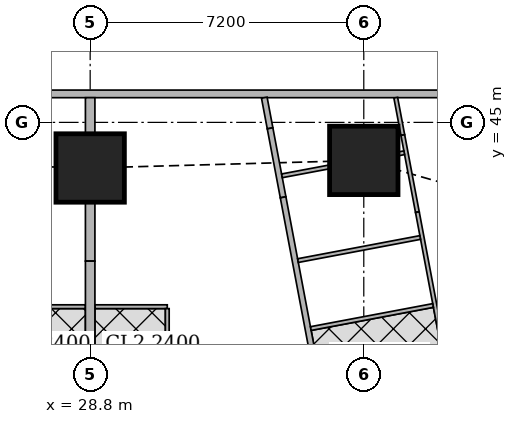
"""IFC4 building model, lengths in metres.
Left out: names, types, materials, properties, quantities, classifications, styles, units other than length and angle.
Written with IfcOpenShell. Run it as: python <this file> out.ifc"""

import sys

from ifc_helpers import new_model, si_unit, direction, frame, frame_2d, origin, origin_2d, place, context, subcontext, project, spatial, rectangle, extrude, element, fill, save


model = new_model("IFC4")
c1 = context("Model", 3, precision=1e-05, world=origin(), true_north=direction((0.0, 1.0)))
c2 = subcontext(c1, "Body", "Model", "MODEL_VIEW")
j1 = project(units=[si_unit("LENGTHUNIT", "METRE"), si_unit("PLANEANGLEUNIT", "RADIAN")], contexts=[c1])
p1 = place(None, origin())
s1 = spatial("IfcSite", under=j1, at=p1, CompositionType="ELEMENT")
p2 = place(p1, origin())
s2 = spatial("IfcBuilding", under=s1, at=p2, CompositionType="ELEMENT")
p3 = place(p2, frame((0.0, 0.0, 169.55)))
s3 = spatial("IfcBuildingStorey", under=s2, at=p3, CompositionType="ELEMENT", Elevation=169.55)
for number, where, z_axis, x_axis in (
    (1, (28.8, 43.8, 0.0), (0.0, 0.0, 1.0), (1.0, 0.0, 0.0)),
    (2, (36.0, 44.0, 0.0), (0.0, 0.0, 1.0), (1.0, 0.0, 0.0)),
):
    element("IfcColumn", number, at=place(p3, frame(where, z_axis=z_axis, x_axis=x_axis)), inside=s3, PredefinedType="COLUMN", context=c2, shape_type="SweptSolid", body=[
        extrude(rectangle(XDim=1.8, YDim=1.8, at=origin_2d()), origin(), (0.0, 0.0, 1.0), 3.75),
    ])
p4 = place(p3, frame((40.106, 45.75, 0.0), z_axis=(0.0, 0.0, 1.0), x_axis=(-1.0, 0.0, 0.0)))
e3 = element("IfcWall", 3, at=p4, inside=s3, PredefinedType="SOLIDWALL", context=c2, shape_type="SweptSolid", body=[
    extrude(rectangle(XDim=37.943, YDim=0.2, at=frame_2d((18.971, 0.0))), origin(), (0.0, 0.0, 1.0), 3.5),
])
p5 = place(p4, frame((8.606, 0.0, 0.9)))
e4 = element("IfcOpeningElement", 4, at=p5, cuts=e3, PredefinedType="OPENING", context=c2, shape_type="SweptSolid", body=[
    extrude(rectangle(XDim=1.8, YDim=1.5, at=frame_2d((0.9, 0.75))), frame((0.0, 0.11, 0.0), z_axis=(0.0, -1.0, 0.0), x_axis=(1.0, 0.0, 0.0)), (0.0, 0.0, 1.0), 0.22),
])
p6 = place(p4, frame((12.206, 0.0, 0.9)))
e5 = element("IfcOpeningElement", 5, at=p6, cuts=e3, PredefinedType="OPENING", context=c2, shape_type="SweptSolid", body=[
    extrude(rectangle(XDim=1.8, YDim=1.5, at=frame_2d((0.9, 0.75))), frame((0.0, 0.11, 0.0), z_axis=(0.0, -1.0, 0.0), x_axis=(1.0, 0.0, 0.0)), (0.0, 0.0, 1.0), 0.22),
])
p7 = place(p4, frame((15.806, 0.0, 0.9)))
e6 = element("IfcOpeningElement", 6, at=p7, cuts=e3, PredefinedType="OPENING", context=c2, shape_type="SweptSolid", body=[
    extrude(rectangle(XDim=1.8, YDim=1.5, at=frame_2d((0.9, 0.75))), frame((0.0, 0.11, 0.0), z_axis=(0.0, -1.0, 0.0), x_axis=(1.0, 0.0, 0.0)), (0.0, 0.0, 1.0), 0.22),
])
p8 = place(p4, frame((19.406, 0.0, 0.9)))
e7 = element("IfcOpeningElement", 7, at=p8, cuts=e3, PredefinedType="OPENING", context=c2, shape_type="SweptSolid", body=[
    extrude(rectangle(XDim=1.8, YDim=1.5, at=frame_2d((0.9, 0.75))), frame((0.0, 0.11, 0.0), z_axis=(0.0, -1.0, 0.0), x_axis=(1.0, 0.0, 0.0)), (0.0, 0.0, 1.0), 0.22),
])
p9 = place(p4, frame((23.006, 0.0, 0.9)))
e8 = element("IfcOpeningElement", 8, at=p9, cuts=e3, PredefinedType="OPENING", context=c2, shape_type="SweptSolid", body=[
    extrude(rectangle(XDim=1.8, YDim=1.5, at=frame_2d((0.9, 0.75))), frame((0.0, 0.11, 0.0), z_axis=(0.0, -1.0, 0.0), x_axis=(1.0, 0.0, 0.0)), (0.0, 0.0, 1.0), 0.22),
])
p10 = place(p4, frame((26.606, 0.0, 0.9)))
e9 = element("IfcOpeningElement", 9, at=p10, cuts=e3, PredefinedType="OPENING", context=c2, shape_type="SweptSolid", body=[
    extrude(rectangle(XDim=1.8, YDim=1.5, at=frame_2d((0.9, 0.75))), frame((0.0, 0.11, 0.0), z_axis=(0.0, -1.0, 0.0), x_axis=(1.0, 0.0, 0.0)), (0.0, 0.0, 1.0), 0.22),
])
p11 = place(p3, frame((33.382, 45.65, 0.0), z_axis=(0.0, 0.0, 1.0), x_axis=(0.185169202764, -0.982706653253, 0.0)))
e10 = element("IfcWall", 10, at=p11, inside=s3, PredefinedType="SOLIDWALL", context=c2, shape_type="SweptSolid", body=[
    extrude(rectangle(XDim=0.82, YDim=0.15, at=frame_2d((0.41, 0.0))), origin(), (0.0, 0.0, 1.0), 3.5),
])
p12 = place(p3, frame((33.534, 44.844, 0.0), z_axis=(0.0, 0.0, 1.0), x_axis=(0.185708872674, -0.982604811005, 0.0)))
e11 = element("IfcWall", 11, at=p12, inside=s3, PredefinedType="SOLIDWALL", context=c2, shape_type="SweptSolid", body=[
    extrude(rectangle(XDim=1.847, YDim=0.15, at=frame_2d((0.924, 0.0))), origin(), (0.0, 0.0, 1.0), 2.1),
])
p13 = place(p3, frame((33.877, 43.029, 0.0), z_axis=(0.0, 0.0, 1.0), x_axis=(0.185596841028, -0.98262597798, 0.0)))
e12 = element("IfcWall", 12, at=p13, inside=s3, PredefinedType="SOLIDWALL", context=c2, shape_type="SweptSolid", body=[
    extrude(rectangle(XDim=41.66, YDim=0.15, at=frame_2d((20.83, 0.0))), origin(), (0.0, 0.0, 1.0), 2.5),
])
p14 = place(p13, frame((8.63, 0.0, 0.0)))
e13 = element("IfcOpeningElement", 13, at=p14, cuts=e12, PredefinedType="OPENING", context=c2, shape_type="SweptSolid", body=[
    extrude(rectangle(XDim=1.0, YDim=2.1, at=frame_2d((0.5, 1.05))), frame((0.0, 0.085, 0.0), z_axis=(0.0, -1.0, 0.0), x_axis=(1.0, 0.0, 0.0)), (0.0, 0.0, 1.0), 0.17),
])
p15 = place(p13, frame((13.841, 0.0, 0.0)))
e14 = element("IfcOpeningElement", 14, at=p15, cuts=e12, PredefinedType="OPENING", context=c2, shape_type="SweptSolid", body=[
    extrude(rectangle(XDim=1.0, YDim=2.1, at=frame_2d((0.5, 1.05))), frame((0.0, 0.085, 0.0), z_axis=(0.0, -1.0, 0.0), x_axis=(1.0, 0.0, 0.0)), (0.0, 0.0, 1.0), 0.17),
])
p16 = place(p13, frame((21.474, 0.0, 0.0)))
e15 = element("IfcOpeningElement", 15, at=p16, cuts=e12, PredefinedType="OPENING", context=c2, shape_type="SweptSolid", body=[
    extrude(rectangle(XDim=1.0, YDim=2.1, at=frame_2d((0.5, 1.05))), frame((0.0, 0.085, 0.0), z_axis=(0.0, -1.0, 0.0), x_axis=(1.0, 0.0, 0.0)), (0.0, 0.0, 1.0), 0.17),
])
p17 = place(p13, frame((30.4, 0.0, 0.0)))
e16 = element("IfcOpeningElement", 16, at=p17, cuts=e12, PredefinedType="OPENING", context=c2, shape_type="SweptSolid", body=[
    extrude(rectangle(XDim=1.0, YDim=2.1, at=frame_2d((0.5, 1.05))), frame((0.0, 0.085, 0.0), z_axis=(0.0, -1.0, 0.0), x_axis=(1.0, 0.0, 0.0)), (0.0, 0.0, 1.0), 0.17),
])
p18 = place(p13, frame((32.288, 0.0, 0.0)))
e17 = element("IfcOpeningElement", 17, at=p18, cuts=e12, PredefinedType="OPENING", context=c2, shape_type="SweptSolid", body=[
    extrude(rectangle(XDim=1.0, YDim=2.1, at=frame_2d((0.5, 1.05))), frame((0.0, 0.085, 0.0), z_axis=(0.0, -1.0, 0.0), x_axis=(1.0, 0.0, 0.0)), (0.0, 0.0, 1.0), 0.17),
])
p19 = place(p3, frame((36.841, 45.65, 0.0), z_axis=(0.0, 0.0, 1.0), x_axis=(0.185789875365, -0.982589498322, 0.0)))
e18 = element("IfcWall", 18, at=p19, inside=s3, PredefinedType="PARTITIONING", context=c2, shape_type="SweptSolid", body=[
    extrude(rectangle(XDim=1.001, YDim=0.1, at=frame_2d((0.5, 0.0))), origin(), (0.0, 0.0, 1.0), 3.5),
])
p20 = place(p3, frame((37.027, 44.666, 0.0), z_axis=(0.0, 0.0, 1.0), x_axis=(0.1855674151, -0.982631535446, 0.0)))
e19 = element("IfcWall", 19, at=p20, inside=s3, PredefinedType="PARTITIONING", context=c2, shape_type="SweptSolid", body=[
    extrude(rectangle(XDim=2.063, YDim=0.1, at=frame_2d((1.031, 0.0))), origin(), (0.0, 0.0, 1.0), 2.1),
])
p21 = place(p3, frame((37.41, 42.639, 0.0), z_axis=(0.0, 0.0, 1.0), x_axis=(0.185579683022, -0.982629218601, 0.0)))
e20 = element("IfcWall", 20, at=p21, inside=s3, PredefinedType="PARTITIONING", context=c2, shape_type="SweptSolid", body=[
    extrude(rectangle(XDim=4.737, YDim=0.1, at=frame_2d((2.369, 0.0))), origin(), (0.0, 0.0, 1.0), 3.5),
])
p22 = place(p21, frame((3.189, 0.0, 0.0)))
e21 = element("IfcOpeningElement", 21, at=p22, cuts=e20, PredefinedType="OPENING", context=c2, shape_type="SweptSolid", body=[
    extrude(rectangle(XDim=0.9, YDim=2.1, at=frame_2d((0.45, 1.05))), frame((0.0, 0.06, 0.0), z_axis=(0.0, -1.0, 0.0), x_axis=(1.0, 0.0, 0.0)), (0.0, 0.0, 1.0), 0.12),
])
p23 = place(p21, frame((1.131, 0.0, 0.0)))
e22 = element("IfcOpeningElement", 22, at=p23, cuts=e20, PredefinedType="OPENING", context=c2, shape_type="SweptSolid", body=[
    extrude(rectangle(XDim=0.9, YDim=2.1, at=frame_2d((0.45, 1.05))), frame((0.0, 0.06, 0.0), z_axis=(0.0, -1.0, 0.0), x_axis=(1.0, 0.0, 0.0)), (0.0, 0.0, 1.0), 0.12),
])
p24 = place(p3, frame((37.064, 44.201, 0.0), z_axis=(0.0, 0.0, 1.0), x_axis=(-0.982960250751, -0.183818240236, 0.0)))
e23 = element("IfcWall", 23, at=p24, inside=s3, PredefinedType="PARTITIONING", context=c2, shape_type="SweptSolid", body=[
    extrude(rectangle(XDim=0.157, YDim=0.1, at=frame_2d((0.078, 0.0))), origin(), (0.0, 0.0, 1.0), 2.1),
])
p25 = place(p3, frame((35.09, 43.828, 0.0), z_axis=(0.0, 0.0, 1.0), x_axis=(-0.982758384778, -0.184894448668, 0.0)))
e24 = element("IfcWall", 24, at=p25, inside=s3, PredefinedType="PARTITIONING", context=c2, shape_type="SweptSolid", body=[
    extrude(rectangle(XDim=1.265, YDim=0.1, at=frame_2d((0.632, 0.0))), origin(), (0.0, 0.0, 1.0), 2.1),
])
p26 = place(p3, frame((37.823, 40.182, 0.0), z_axis=(0.0, 0.0, 1.0), x_axis=(-0.982664729897, -0.18539155487, 0.0)))
e25 = element("IfcWall", 25, at=p26, inside=s3, PredefinedType="PARTITIONING", context=c2, shape_type="SweptSolid", body=[
    extrude(rectangle(XDim=3.274, YDim=0.1, at=frame_2d((1.637, 0.0))), origin(), (0.0, 0.0, 1.0), 3.5),
])
p27 = place(p3, frame((37.485, 41.971, 0.0), z_axis=(0.0, 0.0, 1.0), x_axis=(-0.982610347627, -0.185679575441, 0.0)))
e26 = element("IfcWall", 26, at=p27, inside=s3, PredefinedType="PARTITIONING", context=c2, shape_type="SweptSolid", body=[
    extrude(rectangle(XDim=3.274, YDim=0.1, at=frame_2d((1.637, 0.0))), origin(), (0.0, 0.0, 1.0), 3.5),
])
p28 = place(p27, frame((1.2, 0.0, 0.0)))
e27 = element("IfcOpeningElement", 27, at=p28, cuts=e26, PredefinedType="OPENING", context=c2, shape_type="SweptSolid", body=[
    extrude(rectangle(XDim=0.9, YDim=2.1, at=frame_2d((0.45, 1.05))), frame((0.0, 0.06, 0.0), z_axis=(0.0, -1.0, 0.0), x_axis=(1.0, 0.0, 0.0)), (0.0, 0.0, 1.0), 0.12),
])
p29 = place(p3, frame((26.399, 40.15, 0.0), z_axis=(0.0, 0.0, 1.0), x_axis=(1.0, 0.0, 0.0)))
e28 = element("IfcWall", 28, at=p29, inside=s3, PredefinedType="PARTITIONING", context=c2, shape_type="SweptSolid", body=[
    extrude(rectangle(XDim=2.276, YDim=0.1, at=frame_2d((1.138, 0.0))), origin(), (0.0, 0.0, 1.0), 3.5),
])
p30 = place(p29, frame((0.75, 0.0, 0.0)))
e29 = element("IfcOpeningElement", 29, at=p30, cuts=e28, PredefinedType="OPENING", context=c2, shape_type="SweptSolid", body=[
    extrude(rectangle(XDim=0.9, YDim=2.1, at=frame_2d((0.45, 1.05))), frame((0.0, 0.06, 0.0), z_axis=(0.0, -1.0, 0.0), x_axis=(1.0, 0.0, 0.0)), (0.0, 0.0, 1.0), 0.12),
])
p31 = place(p3, frame((28.925, 40.15, 0.0), z_axis=(0.0, 0.0, 1.0), x_axis=(1.0, 0.0, 0.0)))
e30 = element("IfcWall", 30, at=p31, inside=s3, PredefinedType="PARTITIONING", context=c2, shape_type="SweptSolid", body=[
    extrude(rectangle(XDim=1.904, YDim=0.1, at=frame_2d((0.952, 0.0))), origin(), (0.0, 0.0, 1.0), 3.5),
])
p32 = place(p31, frame((0.425, 0.0, 0.0)))
e31 = element("IfcOpeningElement", 31, at=p32, cuts=e30, PredefinedType="OPENING", context=c2, shape_type="SweptSolid", body=[
    extrude(rectangle(XDim=0.9, YDim=2.1, at=frame_2d((0.45, 1.05))), frame((0.0, 0.06, 0.0), z_axis=(0.0, -1.0, 0.0), x_axis=(1.0, 0.0, 0.0)), (0.0, 0.0, 1.0), 0.12),
])
p33 = place(p3, frame((30.829, 36.825, 0.0), z_axis=(0.0, 0.0, 1.0), x_axis=(0.0, 1.0, 0.0)))
e32 = element("IfcWall", 32, at=p33, inside=s3, PredefinedType="PARTITIONING", context=c2, shape_type="SweptSolid", body=[
    extrude(rectangle(XDim=3.275, YDim=0.1, at=frame_2d((1.638, 0.0))), origin(), (0.0, 0.0, 1.0), 3.5),
])
p34 = place(p3, frame((28.8, 41.35, 0.0), z_axis=(0.0, 0.0, 1.0), x_axis=(0.0, 1.0, 0.0)))
e33 = element("IfcWall", 33, at=p34, inside=s3, PredefinedType="SOLIDWALL", context=c2, shape_type="SweptSolid", body=[
    extrude(rectangle(XDim=1.549, YDim=0.25, at=frame_2d((0.774, 0.0))), origin(), (0.0, 0.0, 1.0), 2.1),
])
p35 = place(p3, frame((28.8, 44.701, 0.0), z_axis=(0.0, 0.0, 1.0), x_axis=(0.0, 1.0, 0.0)))
e34 = element("IfcWall", 34, at=p35, inside=s3, PredefinedType="SOLIDWALL", context=c2, shape_type="SweptSolid", body=[
    extrude(rectangle(XDim=0.949, YDim=0.25, at=frame_2d((0.475, 0.0))), origin(), (0.0, 0.0, 1.0), 2.1),
])
p36 = place(p3, frame((28.8, 38.251, 0.0), z_axis=(0.0, 0.0, 1.0), x_axis=(0.0, 1.0, 0.0)))
e35 = element("IfcWall", 35, at=p36, inside=s3, PredefinedType="SOLIDWALL", context=c2, shape_type="SweptSolid", body=[
    extrude(rectangle(XDim=3.099, YDim=0.25, at=frame_2d((1.55, 0.0))), origin(), (0.0, 0.0, 1.0), 3.5),
])
p37 = place(p5, origin())
e36 = element("IfcWindow", 36, at=p37, inside=s3, PartitioningType="SINGLE_PANEL", PredefinedType="WINDOW", context=c2, shape_type="SweptSolid", body=[
    extrude(rectangle(XDim=1.8, YDim=1.5, at=frame_2d((0.9, 0.75))), frame((0.0, 0.03, 0.0), z_axis=(0.0, -1.0, 0.0), x_axis=(1.0, 0.0, 0.0)), (0.0, 0.0, 1.0), 0.06),
])
fill(e4, e36)
p38 = place(p6, origin())
e37 = element("IfcWindow", 37, at=p38, inside=s3, PartitioningType="SINGLE_PANEL", PredefinedType="WINDOW", context=c2, shape_type="SweptSolid", body=[
    extrude(rectangle(XDim=1.8, YDim=1.5, at=frame_2d((0.9, 0.75))), frame((0.0, 0.03, 0.0), z_axis=(0.0, -1.0, 0.0), x_axis=(1.0, 0.0, 0.0)), (0.0, 0.0, 1.0), 0.06),
])
fill(e5, e37)
p39 = place(p23, origin())
e38 = element("IfcDoor", 38, at=p39, inside=s3, OperationType="SINGLE_SWING_RIGHT", PredefinedType="DOOR", context=c2, shape_type="SweptSolid", body=[
    extrude(rectangle(XDim=0.9, YDim=2.1, at=frame_2d((0.45, 1.05))), frame((0.0, 0.025, 0.0), z_axis=(0.0, -1.0, 0.0), x_axis=(1.0, 0.0, 0.0)), (0.0, 0.0, 1.0), 0.05),
])
fill(e22, e38)
p40 = place(p28, origin())
e39 = element("IfcDoor", 39, at=p40, inside=s3, OperationType="SINGLE_SWING_LEFT", PredefinedType="DOOR", context=c2, shape_type="SweptSolid", body=[
    extrude(rectangle(XDim=0.9, YDim=2.1, at=frame_2d((0.45, 1.05))), frame((0.0, 0.025, 0.0), z_axis=(0.0, -1.0, 0.0), x_axis=(1.0, 0.0, 0.0)), (0.0, 0.0, 1.0), 0.05),
])
fill(e27, e39)
p41 = place(p30, origin())
e40 = element("IfcDoor", 40, at=p41, inside=s3, OperationType="SINGLE_SWING_LEFT", PredefinedType="DOOR", context=c2, shape_type="SweptSolid", body=[
    extrude(rectangle(XDim=0.9, YDim=2.1, at=frame_2d((0.45, 1.05))), frame((0.0, 0.025, 0.0), z_axis=(0.0, -1.0, 0.0), x_axis=(1.0, 0.0, 0.0)), (0.0, 0.0, 1.0), 0.05),
])
fill(e29, e40)
p42 = place(p32, origin())
e41 = element("IfcDoor", 41, at=p42, inside=s3, OperationType="SINGLE_SWING_RIGHT", PredefinedType="DOOR", context=c2, shape_type="SweptSolid", body=[
    extrude(rectangle(XDim=0.9, YDim=2.1, at=frame_2d((0.45, 1.05))), frame((0.0, 0.025, 0.0), z_axis=(0.0, -1.0, 0.0), x_axis=(1.0, 0.0, 0.0)), (0.0, 0.0, 1.0), 0.05),
])
fill(e31, e41)
save(model, sys.argv[1])
